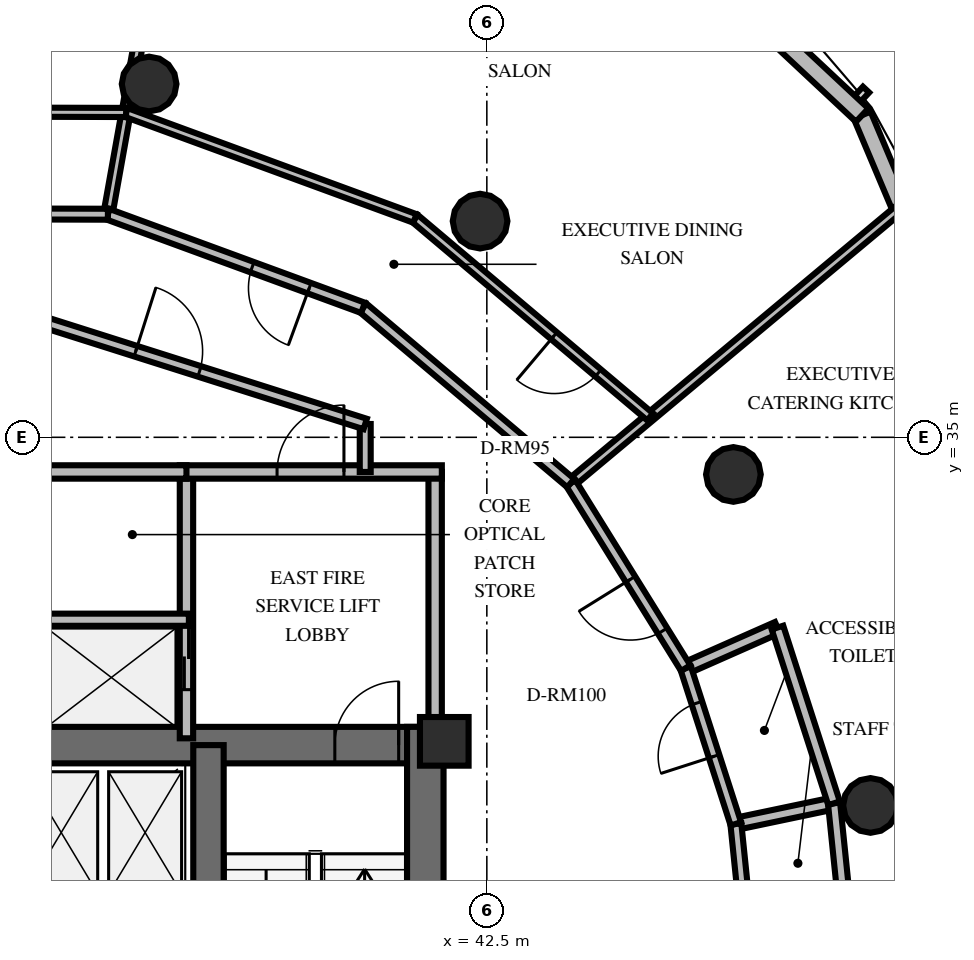
"""IFC4 building model, lengths in metres.
Left out: names, types, materials, properties, quantities, classifications, styles, units other than length and angle.
Written with IfcOpenShell. Run it as: python <this file> out.ifc"""

import sys

from ifc_helpers import new_model, si_unit, direction, frame, frame_2d, origin, origin_2d, place, context, subcontext, project, spatial, rectangle, circle, extrude, element, fill, save


model = new_model("IFC4")
c1 = context("Model", 3, precision=1e-05, world=origin(), true_north=direction((0.0, 1.0)))
c2 = subcontext(c1, "Body", "Model", "MODEL_VIEW")
j1 = project(units=[si_unit("LENGTHUNIT", "METRE"), si_unit("PLANEANGLEUNIT", "RADIAN")], contexts=[c1])
p1 = place(None, origin())
s1 = spatial("IfcSite", under=j1, at=p1, CompositionType="ELEMENT")
p2 = place(p1, origin())
s2 = spatial("IfcBuilding", under=s1, at=p2, CompositionType="ELEMENT")
p3 = place(p2, frame((0.0, 0.0, 277.2)))
s3 = spatial("IfcBuildingStorey", under=s2, at=p3, CompositionType="ELEMENT", Elevation=277.2)
p4 = place(p3, frame((26.222, 29.938, 0.0), z_axis=(0.0, 0.0, 1.0), x_axis=(1.0, 0.0, 0.0)))
e1 = element("IfcWall", 1, at=p4, inside=s3, PredefinedType="SHEAR", context=c2, shape_type="SweptSolid", body=[
    extrude(rectangle(XDim=15.566, YDim=0.6, at=frame_2d((7.783, 0.0))), origin(), (0.0, 0.0, 1.0), 3.6),
])
p5 = place(p4, frame((0.728, 0.0, 0.0)))
e2 = element("IfcOpeningElement", 2, at=p5, cuts=e1, PredefinedType="OPENING", context=c2, shape_type="SweptSolid", body=[
    extrude(rectangle(XDim=1.05, YDim=2.15, at=frame_2d((0.525, 1.075))), frame((0.0, 0.31, 0.0), z_axis=(0.0, -1.0, 0.0), x_axis=(1.0, 0.0, 0.0)), (0.0, 0.0, 1.0), 0.62),
])
p6 = place(p4, frame((13.778, 0.0, 0.0)))
e3 = element("IfcOpeningElement", 3, at=p6, cuts=e1, PredefinedType="OPENING", context=c2, shape_type="SweptSolid", body=[
    extrude(rectangle(XDim=1.05, YDim=2.15, at=frame_2d((0.525, 1.075))), frame((0.0, 0.31, 0.0), z_axis=(0.0, -1.0, 0.0), x_axis=(1.0, 0.0, 0.0)), (0.0, 0.0, 1.0), 0.62),
])
p7 = place(p4, frame((7.228, 0.0, 0.0)))
e4 = element("IfcOpeningElement", 4, at=p7, cuts=e1, PredefinedType="OPENING", context=c2, shape_type="SweptSolid", body=[
    extrude(rectangle(XDim=1.1, YDim=2.15, at=frame_2d((0.55, 1.075))), frame((0.0, 0.31, 0.0), z_axis=(0.0, -1.0, 0.0), x_axis=(1.0, 0.0, 0.0)), (0.0, 0.0, 1.0), 0.62),
])
p8 = place(p3, frame((41.488, 19.962, 0.0), z_axis=(0.0, 0.0, 1.0), x_axis=(0.0, 1.0, 0.0)))
e5 = element("IfcWall", 5, at=p8, inside=s3, PredefinedType="SHEAR", context=c2, shape_type="SweptSolid", body=[
    extrude(rectangle(XDim=10.276, YDim=0.6, at=frame_2d((5.138, 0.0))), origin(), (0.0, 0.0, 1.0), 3.6),
])
p9 = place(p3, frame((37.922, 20.262, 0.0), z_axis=(0.0, 0.0, 1.0), x_axis=(0.0, 1.0, 0.0)))
e6 = element("IfcWall", 6, at=p9, inside=s3, PredefinedType="SHEAR", context=c2, shape_type="SweptSolid", body=[
    extrude(rectangle(XDim=9.676, YDim=0.5, at=frame_2d((4.838, 0.0))), origin(), (0.0, 0.0, 1.0), 3.6),
])
p10 = place(p3, frame((41.8, 30.0, 0.0), z_axis=(0.0, 0.0, 1.0), x_axis=(1.0, 0.0, 0.0)))
e7 = element("IfcColumn", 7, at=p10, inside=s3, PredefinedType="PILASTER", context=c2, shape_type="SweptSolid", body=[
    extrude(rectangle(XDim=0.8, YDim=0.8, at=origin_2d()), origin(), (0.0, 0.0, 1.0), 3.6),
])
for number, where, z_axis, x_axis in (
    (8, (48.81, 28.946, 0.0), (0.0, 0.0, 1.0), (1.0, 0.0, 0.0)),
    (9, (46.555, 34.389, 0.0), (0.0, 0.0, 1.0), (1.0, 0.0, 0.0)),
    (10, (42.389, 38.555, 0.0), (0.0, 0.0, 1.0), (1.0, 0.0, 0.0)),
    (11, (36.946, 40.81, 0.0), (0.0, 0.0, 1.0), (1.0, 0.0, 0.0)),
):
    element("IfcColumn", number, at=place(p3, frame(where, z_axis=z_axis, x_axis=x_axis)), inside=s3, PredefinedType="COLUMN", context=c2, shape_type="SweptSolid", body=[
        extrude(circle(Radius=0.45, at=origin_2d()), origin(), (0.0, 0.0, 1.0), 3.6),
    ])
p11 = place(p3, frame((51.029, 34.713, 0.0), z_axis=(0.0, 0.0, 1.0), x_axis=(-0.388609687406, 0.921402469529, 0.0)))
e12 = element("IfcWall", 12, at=p11, inside=s3, PredefinedType="SOLIDWALL", context=c2, shape_type="SweptSolid", body=[
    extrude(rectangle(XDim=6.062, YDim=0.3, at=frame_2d((3.031, 0.0))), origin(), (0.0, 0.0, 1.0), 2.76),
])
p12 = place(p11, frame((1.981, 0.0, 0.8)))
e13 = element("IfcOpeningElement", 13, at=p12, cuts=e12, PredefinedType="OPENING", context=c2, shape_type="SweptSolid", body=[
    extrude(rectangle(XDim=2.1, YDim=1.85, at=frame_2d((1.05, 0.925))), frame((0.0, 0.16, 0.0), z_axis=(0.0, -1.0, 0.0), x_axis=(1.0, 0.0, 0.0)), (0.0, 0.0, 1.0), 0.32),
])
p13 = place(p3, frame((48.673, 40.298, 0.0), z_axis=(0.0, 0.0, 1.0), x_axis=(-0.730137889504, 0.68329983339, 0.0)))
e14 = element("IfcWall", 14, at=p13, inside=s3, PredefinedType="SOLIDWALL", context=c2, shape_type="SweptSolid", body=[
    extrude(rectangle(XDim=5.65, YDim=0.3, at=frame_2d((2.825, 0.0))), origin(), (0.0, 0.0, 1.0), 2.76),
])
p14 = place(p13, frame((1.775, 0.0, 0.8)))
e15 = element("IfcOpeningElement", 15, at=p14, cuts=e14, PredefinedType="OPENING", context=c2, shape_type="SweptSolid", body=[
    extrude(rectangle(XDim=2.1, YDim=1.85, at=frame_2d((1.05, 0.925))), frame((0.0, 0.16, 0.0), z_axis=(0.0, -1.0, 0.0), x_axis=(1.0, 0.0, 0.0)), (0.0, 0.0, 1.0), 0.32),
])
p15 = place(p3, frame((37.56, 30.05, 0.0), z_axis=(0.0, 0.0, 1.0), x_axis=(0.0, 1.0, 0.0)))
e16 = element("IfcWall", 16, at=p15, inside=s3, PredefinedType="SOLIDWALL", context=c2, shape_type="SweptSolid", body=[
    extrude(rectangle(XDim=4.38, YDim=0.22, at=frame_2d((2.19, 0.0))), origin(), (0.0, 0.0, 1.0), 2.46),
])
p16 = place(p15, frame((0.8, 0.0, 0.0)))
e17 = element("IfcOpeningElement", 17, at=p16, cuts=e16, PredefinedType="OPENING", context=c2, shape_type="SweptSolid", body=[
    extrude(rectangle(XDim=1.05, YDim=2.1, at=frame_2d((0.525, 1.05))), frame((0.0, 0.12, 0.0), z_axis=(0.0, -1.0, 0.0), x_axis=(1.0, 0.0, 0.0)), (0.0, 0.0, 1.0), 0.24),
])
p17 = place(p3, frame((41.65, 30.05, 0.0), z_axis=(0.0, 0.0, 1.0), x_axis=(0.0, 1.0, 0.0)))
e18 = element("IfcWall", 18, at=p17, inside=s3, PredefinedType="SOLIDWALL", context=c2, shape_type="SweptSolid", body=[
    extrude(rectangle(XDim=4.38, YDim=0.22, at=frame_2d((2.19, 0.0))), origin(), (0.0, 0.0, 1.0), 2.46),
])
p18 = place(p3, frame((37.45, 34.43, 0.0), z_axis=(0.0, 0.0, 1.0), x_axis=(1.0, 0.0, 0.0)))
e19 = element("IfcWall", 19, at=p18, inside=s3, PredefinedType="SOLIDWALL", context=c2, shape_type="SweptSolid", body=[
    extrude(rectangle(XDim=4.31, YDim=0.22, at=frame_2d((2.155, 0.0))), origin(), (0.0, 0.0, 1.0), 2.46),
])
p19 = place(p18, frame((1.6, 0.0, 0.0)))
e20 = element("IfcOpeningElement", 20, at=p19, cuts=e19, PredefinedType="OPENING", context=c2, shape_type="SweptSolid", body=[
    extrude(rectangle(XDim=1.1, YDim=2.15, at=frame_2d((0.55, 1.075))), frame((0.0, 0.12, 0.0), z_axis=(0.0, -1.0, 0.0), x_axis=(1.0, 0.0, 0.0)), (0.0, 0.0, 1.0), 0.24),
])
p20 = place(p3, frame((35.05, 32.0, 0.0), z_axis=(0.0, 0.0, 1.0), x_axis=(1.0, 0.0, 0.0)))
e21 = element("IfcWall", 21, at=p20, inside=s3, PredefinedType="SOLIDWALL", context=c2, shape_type="SweptSolid", body=[
    extrude(rectangle(XDim=2.55, YDim=0.2, at=frame_2d((1.275, 0.0))), origin(), (0.0, 0.0, 1.0), 2.46),
])
p21 = place(p3, frame((30.44, 34.43, 0.0), z_axis=(0.0, 0.0, 1.0), x_axis=(1.0, 0.0, 0.0)))
e22 = element("IfcWall", 22, at=p21, inside=s3, PredefinedType="SOLIDWALL", context=c2, shape_type="SweptSolid", body=[
    extrude(rectangle(XDim=7.12, YDim=0.22, at=frame_2d((3.56, 0.0))), origin(), (0.0, 0.0, 1.0), 2.46),
])
p22 = place(p21, frame((3.01, 0.0, 0.0)))
e23 = element("IfcOpeningElement", 23, at=p22, cuts=e22, PredefinedType="OPENING", context=c2, shape_type="SweptSolid", body=[
    extrude(rectangle(XDim=1.1, YDim=2.15, at=frame_2d((0.55, 1.075))), frame((0.0, 0.12, 0.0), z_axis=(0.0, -1.0, 0.0), x_axis=(1.0, 0.0, 0.0)), (0.0, 0.0, 1.0), 0.24),
])
p23 = place(p3, frame((40.5, 35.219, 0.0), z_axis=(0.0, 0.0, 1.0), x_axis=(0.0, -1.0, 0.0)))
e24 = element("IfcWall", 24, at=p23, inside=s3, PredefinedType="PARTITIONING", context=c2, shape_type="SweptSolid", body=[
    extrude(rectangle(XDim=0.789, YDim=0.18, at=frame_2d((0.395, 0.0))), origin(), (0.0, 0.0, 1.0), 2.46),
])
p24 = place(p3, frame((34.0, 37.28, 0.0), z_axis=(0.0, 0.0, 1.0), x_axis=(0.953228121756, -0.302251795518, 0.0)))
e25 = element("IfcWall", 25, at=p24, inside=s3, PredefinedType="PARTITIONING", context=c2, shape_type="SweptSolid", body=[
    extrude(rectangle(XDim=6.819, YDim=0.18, at=frame_2d((3.409, 0.0))), origin(), (0.0, 0.0, 1.0), 2.46),
])
p25 = place(p24, frame((2.86, 0.0, 0.0)))
e26 = element("IfcOpeningElement", 26, at=p25, cuts=e25, PredefinedType="OPENING", context=c2, shape_type="SweptSolid", body=[
    extrude(rectangle(XDim=1.1, YDim=2.15, at=frame_2d((0.55, 1.075))), frame((0.0, 0.1, 0.0), z_axis=(0.0, -1.0, 0.0), x_axis=(1.0, 0.0, 0.0)), (0.0, 0.0, 1.0), 0.2),
])
p26 = place(p3, frame((46.596, 28.643, 0.0), z_axis=(0.0, 0.0, 1.0), x_axis=(0.978687703769, 0.20535427556, 0.0)))
e27 = element("IfcWall", 27, at=p26, inside=s3, PredefinedType="PLUMBINGWALL", context=c2, shape_type="SweptSolid", body=[
    extrude(rectangle(XDim=1.65, YDim=0.2, at=frame_2d((0.825, 0.0))), origin(), (0.0, 0.0, 1.0), 2.46),
])
p27 = place(p3, frame((48.52, 25.962, 0.0), z_axis=(0.0, 0.0, 1.0), x_axis=(-0.101900297464, 0.994794616681, 0.0)))
e28 = element("IfcWall", 28, at=p27, inside=s3, PredefinedType="PLUMBINGWALL", context=c2, shape_type="SweptSolid", body=[
    extrude(rectangle(XDim=3.036, YDim=0.2, at=frame_2d((1.518, 0.0))), origin(), (0.0, 0.0, 1.0), 2.46),
])
p28 = place(p3, frame((46.87, 25.966, 0.0), z_axis=(0.0, 0.0, 1.0), x_axis=(-0.101992026191, 0.994785216312, 0.0)))
e29 = element("IfcWall", 29, at=p28, inside=s3, PredefinedType="PARTITIONING", context=c2, shape_type="SweptSolid", body=[
    extrude(rectangle(XDim=2.69, YDim=0.18, at=frame_2d((1.345, 0.0))), origin(), (0.0, 0.0, 1.0), 2.46),
])
p29 = place(p28, frame((0.603, 0.0, 0.0)))
e30 = element("IfcOpeningElement", 30, at=p29, cuts=e29, PredefinedType="OPENING", context=c2, shape_type="SweptSolid", body=[
    extrude(rectangle(XDim=0.92, YDim=2.1, at=frame_2d((0.46, 1.05))), frame((0.0, 0.1, 0.0), z_axis=(0.0, -1.0, 0.0), x_axis=(1.0, 0.0, 0.0)), (0.0, 0.0, 1.0), 0.2),
])
p30 = place(p3, frame((45.771, 31.204, 0.0), z_axis=(0.0, 0.0, 1.0), x_axis=(0.914584805852, 0.404394155378, 0.0)))
e31 = element("IfcWall", 31, at=p30, inside=s3, PredefinedType="PLUMBINGWALL", context=c2, shape_type="SweptSolid", body=[
    extrude(rectangle(XDim=1.65, YDim=0.2, at=frame_2d((0.825, 0.0))), origin(), (0.0, 0.0, 1.0), 2.46),
])
p31 = place(p3, frame((48.211, 28.982, 0.0), z_axis=(0.0, 0.0, 1.0), x_axis=(-0.306584473664, 0.951843453782, 0.0)))
e32 = element("IfcWall", 32, at=p31, inside=s3, PredefinedType="PLUMBINGWALL", context=c2, shape_type="SweptSolid", body=[
    extrude(rectangle(XDim=3.036, YDim=0.2, at=frame_2d((1.518, 0.0))), origin(), (0.0, 0.0, 1.0), 2.46),
])
p32 = place(p3, frame((46.596, 28.643, 0.0), z_axis=(0.0, 0.0, 1.0), x_axis=(-0.306520218398, 0.951864147719, 0.0)))
e33 = element("IfcWall", 33, at=p32, inside=s3, PredefinedType="PARTITIONING", context=c2, shape_type="SweptSolid", body=[
    extrude(rectangle(XDim=2.69, YDim=0.18, at=frame_2d((1.345, 0.0))), origin(), (0.0, 0.0, 1.0), 2.46),
])
p33 = place(p32, frame((1.167, 0.0, 0.0)))
e34 = element("IfcOpeningElement", 34, at=p33, cuts=e33, PredefinedType="OPENING", context=c2, shape_type="SweptSolid", body=[
    extrude(rectangle(XDim=0.92, YDim=2.1, at=frame_2d((0.46, 1.05))), frame((0.0, 0.1, 0.0), z_axis=(0.0, -1.0, 0.0), x_axis=(1.0, 0.0, 0.0)), (0.0, 0.0, 1.0), 0.2),
])
p34 = place(p3, frame((43.881, 34.247, 0.0), z_axis=(0.0, 0.0, 1.0), x_axis=(0.767720640374, 0.640784689536, 0.0)))
e35 = element("IfcWall", 35, at=p34, inside=s3, PredefinedType="PARTITIONING", context=c2, shape_type="SweptSolid", body=[
    extrude(rectangle(XDim=7.318, YDim=0.15, at=frame_2d((3.659, 0.0))), origin(), (0.0, 0.0, 1.0), 2.46),
])
p35 = place(p3, frame((45.771, 31.204, 0.0), z_axis=(0.0, 0.0, 1.0), x_axis=(-0.527693632299, 0.849434771145, 0.0)))
e36 = element("IfcWall", 36, at=p35, inside=s3, PredefinedType="PARTITIONING", context=c2, shape_type="SweptSolid", body=[
    extrude(rectangle(XDim=3.582, YDim=0.18, at=frame_2d((1.791, 0.0))), origin(), (0.0, 0.0, 1.0), 2.46),
])
p36 = place(p35, frame((0.721, 0.0, 0.0)))
e37 = element("IfcOpeningElement", 37, at=p36, cuts=e36, PredefinedType="OPENING", context=c2, shape_type="SweptSolid", body=[
    extrude(rectangle(XDim=1.0, YDim=2.15, at=frame_2d((0.5, 1.075))), frame((0.0, 0.1, 0.0), z_axis=(0.0, -1.0, 0.0), x_axis=(1.0, 0.0, 0.0)), (0.0, 0.0, 1.0), 0.2),
])
p37 = place(p3, frame((36.268, 38.669, 0.0), z_axis=(0.0, 0.0, 1.0), x_axis=(0.176213223455, 0.984352020306, 0.0)))
e38 = element("IfcWall", 38, at=p37, inside=s3, PredefinedType="PARTITIONING", context=c2, shape_type="SweptSolid", body=[
    extrude(rectangle(XDim=7.318, YDim=0.15, at=frame_2d((3.659, 0.0))), origin(), (0.0, 0.0, 1.0), 2.46),
])
p38 = place(p3, frame((43.881, 34.247, 0.0), z_axis=(0.0, 0.0, 1.0), x_axis=(-0.764357098744, 0.644793164976, 0.0)))
e39 = element("IfcWall", 39, at=p38, inside=s3, PredefinedType="PARTITIONING", context=c2, shape_type="SweptSolid", body=[
    extrude(rectangle(XDim=4.47, YDim=0.18, at=frame_2d((2.235, 0.0))), origin(), (0.0, 0.0, 1.0), 2.46),
])
p39 = place(p3, frame((40.464, 37.129, 0.0), z_axis=(0.0, 0.0, 1.0), x_axis=(-0.938786245945, 0.3445001951, 0.0)))
e40 = element("IfcWall", 40, at=p39, inside=s3, PredefinedType="PARTITIONING", context=c2, shape_type="SweptSolid", body=[
    extrude(rectangle(XDim=4.47, YDim=0.18, at=frame_2d((2.235, 0.0))), origin(), (0.0, 0.0, 1.0), 2.46),
])
p40 = place(p39, frame((0.942, 0.0, 0.0)))
e41 = element("IfcOpeningElement", 41, at=p40, cuts=e40, PredefinedType="OPENING", context=c2, shape_type="SweptSolid", body=[
    extrude(rectangle(XDim=1.0, YDim=2.15, at=frame_2d((0.5, 1.075))), frame((0.0, 0.1, 0.0), z_axis=(0.0, -1.0, 0.0), x_axis=(1.0, 0.0, 0.0)), (0.0, 0.0, 1.0), 0.2),
])
p41 = place(p3, frame((45.186, 35.336, 0.0), z_axis=(0.0, 0.0, 1.0), x_axis=(-0.764355389284, 0.644795191415, 0.0)))
e42 = element("IfcWall", 42, at=p41, inside=s3, PredefinedType="PARTITIONING", context=c2, shape_type="SweptSolid", body=[
    extrude(rectangle(XDim=5.06, YDim=0.15, at=frame_2d((2.53, 0.0))), origin(), (0.0, 0.0, 1.0), 2.46),
])
p42 = place(p41, frame((1.117, 0.0, 0.0)))
e43 = element("IfcOpeningElement", 43, at=p42, cuts=e42, PredefinedType="OPENING", context=c2, shape_type="SweptSolid", body=[
    extrude(rectangle(XDim=0.95, YDim=2.15, at=frame_2d((0.475, 1.075))), frame((0.0, 0.085, 0.0), z_axis=(0.0, -1.0, 0.0), x_axis=(1.0, 0.0, 0.0)), (0.0, 0.0, 1.0), 0.17),
])
p43 = place(p3, frame((41.318, 38.599, 0.0), z_axis=(0.0, 0.0, 1.0), x_axis=(-0.938792079833, 0.344484296948, 0.0)))
e44 = element("IfcWall", 44, at=p43, inside=s3, PredefinedType="PARTITIONING", context=c2, shape_type="SweptSolid", body=[
    extrude(rectangle(XDim=5.06, YDim=0.15, at=frame_2d((2.53, 0.0))), origin(), (0.0, 0.0, 1.0), 2.46),
])
p44 = place(p3, frame((36.268, 38.669, 0.0), z_axis=(0.0, 0.0, 1.0), x_axis=(-0.999996563088, 0.002621795665, 0.0)))
e45 = element("IfcWall", 45, at=p44, inside=s3, PredefinedType="PARTITIONING", context=c2, shape_type="SweptSolid", body=[
    extrude(rectangle(XDim=4.47, YDim=0.18, at=frame_2d((2.235, 0.0))), origin(), (0.0, 0.0, 1.0), 2.46),
])
p45 = place(p44, frame((1.735, 0.0, 0.0)))
e46 = element("IfcOpeningElement", 46, at=p45, cuts=e45, PredefinedType="OPENING", context=c2, shape_type="SweptSolid", body=[
    extrude(rectangle(XDim=1.0, YDim=2.15, at=frame_2d((0.5, 1.075))), frame((0.0, 0.1, 0.0), z_axis=(0.0, -1.0, 0.0), x_axis=(1.0, 0.0, 0.0)), (0.0, 0.0, 1.0), 0.2),
])
p46 = place(p3, frame((36.568, 40.342, 0.0), z_axis=(0.0, 0.0, 1.0), x_axis=(-0.999996605902, 0.002605414297, 0.0)))
e47 = element("IfcWall", 47, at=p46, inside=s3, PredefinedType="PARTITIONING", context=c2, shape_type="SweptSolid", body=[
    extrude(rectangle(XDim=5.06, YDim=0.15, at=frame_2d((2.53, 0.0))), origin(), (0.0, 0.0, 1.0), 2.46),
])
p47 = place(p46, frame((2.055, 0.0, 0.0)))
e48 = element("IfcOpeningElement", 48, at=p47, cuts=e47, PredefinedType="OPENING", context=c2, shape_type="SweptSolid", body=[
    extrude(rectangle(XDim=0.95, YDim=2.15, at=frame_2d((0.475, 1.075))), frame((0.0, 0.085, 0.0), z_axis=(0.0, -1.0, 0.0), x_axis=(1.0, 0.0, 0.0)), (0.0, 0.0, 1.0), 0.17),
])
p48 = place(p6, origin())
e49 = element("IfcDoor", 49, at=p48, inside=s3, OperationType="SINGLE_SWING_RIGHT", PredefinedType="DOOR", context=c2, shape_type="SweptSolid", body=[
    extrude(rectangle(XDim=1.05, YDim=2.15, at=frame_2d((0.525, 1.075))), frame((0.0, 0.025, 0.0), z_axis=(0.0, -1.0, 0.0), x_axis=(1.0, 0.0, 0.0)), (0.0, 0.0, 1.0), 0.05),
])
fill(e3, e49)
p49 = place(p19, origin())
e50 = element("IfcDoor", 50, at=p49, inside=s3, OperationType="SINGLE_SWING_RIGHT", PredefinedType="DOOR", context=c2, shape_type="SweptSolid", body=[
    extrude(rectangle(XDim=1.1, YDim=2.15, at=frame_2d((0.55, 1.075))), frame((0.0, 0.025, 0.0), z_axis=(0.0, -1.0, 0.0), x_axis=(1.0, 0.0, 0.0)), (0.0, 0.0, 1.0), 0.05),
])
fill(e20, e50)
p50 = place(p16, origin())
e51 = element("IfcDoor", 51, at=p50, inside=s3, OperationType="DOUBLE_DOOR_SLIDING", PredefinedType="USERDEFINED", context=c2, shape_type="SweptSolid", body=[
    extrude(rectangle(XDim=1.05, YDim=2.1, at=frame_2d((0.525, 1.05))), frame((0.0, 0.025, 0.0), z_axis=(0.0, -1.0, 0.0), x_axis=(1.0, 0.0, 0.0)), (0.0, 0.0, 1.0), 0.05),
])
fill(e17, e51)
p51 = place(p25, origin())
e52 = element("IfcDoor", 52, at=p51, inside=s3, OperationType="SINGLE_SWING_LEFT", PredefinedType="DOOR", context=c2, shape_type="SweptSolid", body=[
    extrude(rectangle(XDim=1.1, YDim=2.15, at=frame_2d((0.55, 1.075))), frame((0.0, 0.025, 0.0), z_axis=(0.0, -1.0, 0.0), x_axis=(1.0, 0.0, 0.0)), (0.0, 0.0, 1.0), 0.05),
])
fill(e26, e52)
p52 = place(p33, origin())
e53 = element("IfcDoor", 53, at=p52, inside=s3, OperationType="SINGLE_SWING_LEFT", PredefinedType="DOOR", context=c2, shape_type="SweptSolid", body=[
    extrude(rectangle(XDim=0.92, YDim=2.1, at=frame_2d((0.46, 1.05))), frame((0.0, 0.025, 0.0), z_axis=(0.0, -1.0, 0.0), x_axis=(1.0, 0.0, 0.0)), (0.0, 0.0, 1.0), 0.05),
])
fill(e34, e53)
p53 = place(p36, origin())
e54 = element("IfcDoor", 54, at=p53, inside=s3, OperationType="SINGLE_SWING_RIGHT", PredefinedType="DOOR", context=c2, shape_type="SweptSolid", body=[
    extrude(rectangle(XDim=1.0, YDim=2.15, at=frame_2d((0.5, 1.075))), frame((0.0, 0.025, 0.0), z_axis=(0.0, -1.0, 0.0), x_axis=(1.0, 0.0, 0.0)), (0.0, 0.0, 1.0), 0.05),
])
fill(e37, e54)
p54 = place(p40, origin())
e55 = element("IfcDoor", 55, at=p54, inside=s3, OperationType="SINGLE_SWING_LEFT", PredefinedType="DOOR", context=c2, shape_type="SweptSolid", body=[
    extrude(rectangle(XDim=1.0, YDim=2.15, at=frame_2d((0.5, 1.075))), frame((0.0, 0.025, 0.0), z_axis=(0.0, -1.0, 0.0), x_axis=(1.0, 0.0, 0.0)), (0.0, 0.0, 1.0), 0.05),
])
fill(e41, e55)
p55 = place(p42, origin())
e56 = element("IfcDoor", 56, at=p55, inside=s3, OperationType="SINGLE_SWING_RIGHT", PredefinedType="DOOR", context=c2, shape_type="SweptSolid", body=[
    extrude(rectangle(XDim=0.95, YDim=2.15, at=frame_2d((0.475, 1.075))), frame((0.0, 0.025, 0.0), z_axis=(0.0, -1.0, 0.0), x_axis=(1.0, 0.0, 0.0)), (0.0, 0.0, 1.0), 0.05),
])
fill(e43, e56)
save(model, sys.argv[1])
